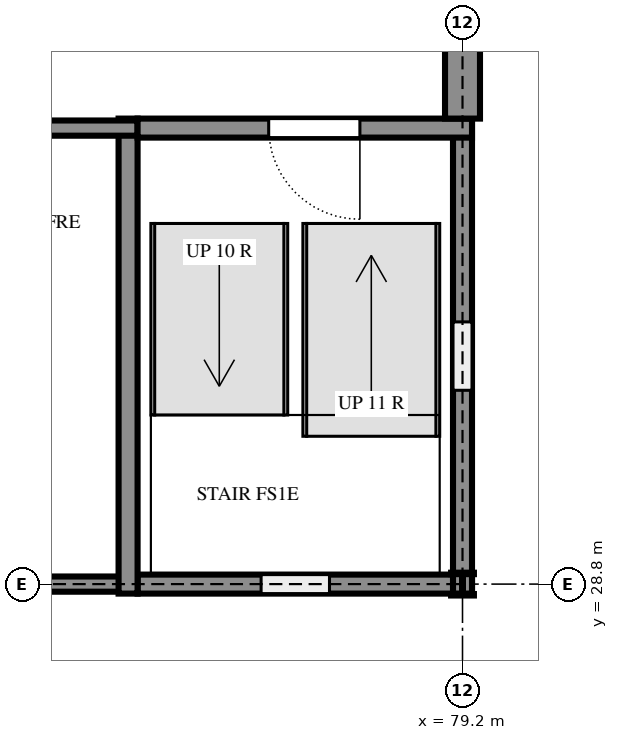
"""IFC4 building model, lengths in metres.
Left out: names, types, materials, properties, quantities, classifications, styles, units other than length and angle.
Written with IfcOpenShell. Run it as: python <this file> out.ifc"""

import sys

from ifc_helpers import new_model, si_unit, direction, frame, frame_2d, origin, origin_2d, place, context, subcontext, project, spatial, rectangle, i_section, extrude, element, fill, save


model = new_model("IFC4")
c1 = context("Model", 3, precision=1e-05, world=origin(), true_north=direction((0.0, 1.0)))
c2 = subcontext(c1, "Body", "Model", "MODEL_VIEW")
j1 = project(units=[si_unit("LENGTHUNIT", "METRE"), si_unit("PLANEANGLEUNIT", "RADIAN")], contexts=[c1])
p1 = place(None, origin())
s1 = spatial("IfcSite", under=j1, at=p1, CompositionType="ELEMENT")
p2 = place(p1, origin())
s2 = spatial("IfcBuilding", under=s1, at=p2, CompositionType="ELEMENT")
p3 = place(p2, frame((0.0, 0.0, 3.6)))
s3 = spatial("IfcBuildingStorey", under=s2, at=p3, CompositionType="ELEMENT", Elevation=3.6)
p4 = place(p3, frame((79.2, 28.8, 0.0), z_axis=(0.0, 0.0, 1.0), x_axis=(1.0, 0.0, 0.0)))
e1 = element("IfcColumn", 1, at=p4, inside=s3, PredefinedType="COLUMN", context=c2, shape_type="SweptSolid", body=[
    extrude(i_section(OverallWidth=0.3, OverallDepth=0.3, WebThickness=0.011, FlangeThickness=0.019, FilletRadius=0.027, at=origin_2d()), origin(), (0.0, 0.0, 1.0), 3.6),
])
p5 = place(p3, frame((71.9, 28.8, 0.0), z_axis=(0.0, 0.0, 1.0), x_axis=(1.0, 0.0, 0.0)))
e2 = element("IfcWall", 2, at=p5, inside=s3, PredefinedType="SHEAR", context=c2, shape_type="SweptSolid", body=[
    extrude(rectangle(XDim=3.025, YDim=0.2, at=frame_2d((1.513, 0.0))), origin(), (0.0, 0.0, 1.0), 3.6),
])
p6 = place(p3, frame((74.925, 28.8, 0.0), z_axis=(0.0, 0.0, 1.0), x_axis=(1.0, 0.0, 0.0)))
e3 = element("IfcWall", 3, at=p6, inside=s3, PredefinedType="SHEAR", context=c2, shape_type="SweptSolid", body=[
    extrude(rectangle(XDim=4.4, YDim=0.25, at=frame_2d((2.2, 0.0))), origin(), (0.0, 0.0, 1.0), 3.6),
])
p7 = place(p6, frame((1.625, 0.0, 0.6)))
e4 = element("IfcOpeningElement", 4, at=p7, cuts=e3, PredefinedType="OPENING", context=c2, shape_type="SweptSolid", body=[
    extrude(rectangle(XDim=0.9, YDim=2.1, at=frame_2d((0.45, 1.05))), frame((0.0, 0.135, 0.0), z_axis=(0.0, -1.0, 0.0), x_axis=(1.0, 0.0, 0.0)), (0.0, 0.0, 1.0), 0.27),
])
p8 = place(p3, frame((79.2, 28.675, 0.0), z_axis=(0.0, 0.0, 1.0), x_axis=(0.0, 1.0, 0.0)))
e5 = element("IfcWall", 5, at=p8, inside=s3, PredefinedType="SHEAR", context=c2, shape_type="SweptSolid", body=[
    extrude(rectangle(XDim=6.25, YDim=0.25, at=frame_2d((3.125, 0.0))), origin(), (0.0, 0.0, 1.0), 3.6),
])
p9 = place(p8, frame((2.675, 0.0, 0.6)))
e6 = element("IfcOpeningElement", 6, at=p9, cuts=e5, PredefinedType="OPENING", context=c2, shape_type="SweptSolid", body=[
    extrude(rectangle(XDim=0.9, YDim=2.1, at=frame_2d((0.45, 1.05))), frame((0.0, 0.135, 0.0), z_axis=(0.0, -1.0, 0.0), x_axis=(1.0, 0.0, 0.0)), (0.0, 0.0, 1.0), 0.27),
])
p10 = place(p3, frame((74.8, 34.925, 0.0), z_axis=(0.0, 0.0, 1.0), x_axis=(0.0, -1.0, 0.0)))
e7 = element("IfcWall", 7, at=p10, inside=s3, PredefinedType="SHEAR", context=c2, shape_type="SweptSolid", body=[
    extrude(rectangle(XDim=6.25, YDim=0.25, at=frame_2d((3.125, 0.0))), origin(), (0.0, 0.0, 1.0), 3.6),
])
p11 = place(p3, frame((74.925, 34.8, 0.0), z_axis=(0.0, 0.0, 1.0), x_axis=(-1.0, 0.0, 0.0)))
e8 = element("IfcWall", 8, at=p11, inside=s3, PredefinedType="SHEAR", context=c2, shape_type="SweptSolid", body=[
    extrude(rectangle(XDim=3.025, YDim=0.2, at=frame_2d((1.513, 0.0))), origin(), (0.0, 0.0, 1.0), 3.6),
])
p12 = place(p3, frame((79.325, 34.8, 0.0), z_axis=(0.0, 0.0, 1.0), x_axis=(-1.0, 0.0, 0.0)))
e9 = element("IfcWall", 9, at=p12, inside=s3, PredefinedType="SHEAR", context=c2, shape_type="SweptSolid", body=[
    extrude(rectangle(XDim=4.4, YDim=0.25, at=frame_2d((2.2, 0.0))), origin(), (0.0, 0.0, 1.0), 3.6),
])
p13 = place(p12, frame((1.475, 0.0, 0.0)))
e10 = element("IfcOpeningElement", 10, at=p13, cuts=e9, PredefinedType="OPENING", context=c2, shape_type="SweptSolid", body=[
    extrude(rectangle(XDim=1.2, YDim=2.4, at=frame_2d((0.6, 1.2))), frame((0.0, 0.135, 0.0), z_axis=(0.0, -1.0, 0.0), x_axis=(1.0, 0.0, 0.0)), (0.0, 0.0, 1.0), 0.27),
])
p14 = place(p3, frame((79.2, 34.925, 0.0), z_axis=(0.0, 0.0, 1.0), x_axis=(0.0, 1.0, 0.0)))
e11 = element("IfcWall", 11, at=p14, inside=s3, PredefinedType="SOLIDWALL", context=c2, shape_type="SweptSolid", body=[
    extrude(rectangle(XDim=1.225, YDim=0.46, at=frame_2d((0.612, 0.0))), origin(), (0.0, 0.0, 1.0), 3.22),
])
p15 = place(p9, origin())
e12 = element("IfcWindow", 12, at=p15, inside=s3, PartitioningType="SINGLE_PANEL", PredefinedType="WINDOW", context=c2, shape_type="SweptSolid", body=[
    extrude(rectangle(XDim=0.9, YDim=2.1, at=frame_2d((0.45, 1.05))), frame((0.0, 0.03, 0.0), z_axis=(0.0, -1.0, 0.0), x_axis=(1.0, 0.0, 0.0)), (0.0, 0.0, 1.0), 0.06),
])
fill(e6, e12)
p16 = place(p7, origin())
e13 = element("IfcWindow", 13, at=p16, inside=s3, PartitioningType="SINGLE_PANEL", PredefinedType="WINDOW", context=c2, shape_type="SweptSolid", body=[
    extrude(rectangle(XDim=0.9, YDim=2.1, at=frame_2d((0.45, 1.05))), frame((0.0, 0.03, 0.0), z_axis=(0.0, -1.0, 0.0), x_axis=(1.0, 0.0, 0.0)), (0.0, 0.0, 1.0), 0.06),
])
fill(e4, e13)
p17 = place(p13, origin())
e14 = element("IfcDoor", 14, at=p17, inside=s3, OperationType="SINGLE_SWING_RIGHT", PredefinedType="DOOR", context=c2, shape_type="SweptSolid", body=[
    extrude(rectangle(XDim=1.2, YDim=2.4, at=frame_2d((0.6, 1.2))), frame((0.0, 0.025, 0.0), z_axis=(0.0, -1.0, 0.0), x_axis=(1.0, 0.0, 0.0)), (0.0, 0.0, 1.0), 0.05),
])
fill(e10, e14)
save(model, sys.argv[1])
